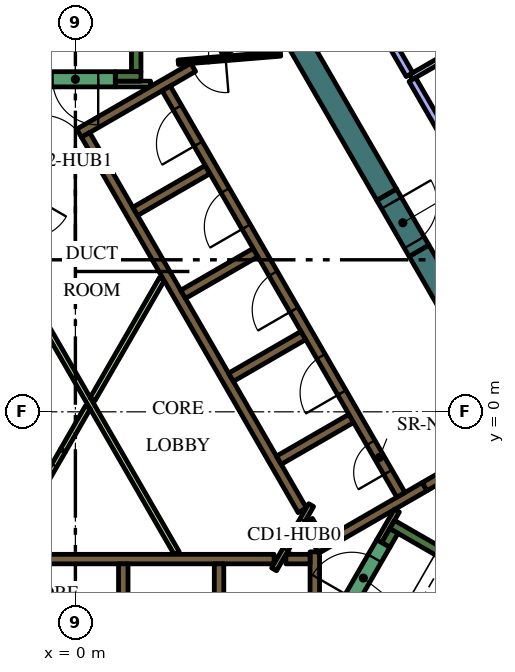
"""IFC4 building model, lengths in metres.
Left out: names, types, materials, properties, quantities, classifications, styles, units other than length and angle.
Written with IfcOpenShell. Run it as: python <this file> out.ifc"""

import sys

from ifc_helpers import new_model, si_unit, direction, frame, frame_2d, origin, place, context, subcontext, project, spatial, rectangle, extrude, element, fill, save


model = new_model("IFC4")
c1 = context("Model", 3, precision=1e-05, world=origin(), true_north=direction((0.0, 1.0)))
c2 = subcontext(c1, "Body", "Model", "MODEL_VIEW")
j1 = project(units=[si_unit("LENGTHUNIT", "METRE"), si_unit("PLANEANGLEUNIT", "RADIAN")], contexts=[c1])
p1 = place(None, origin())
s1 = spatial("IfcSite", under=j1, at=p1, CompositionType="ELEMENT")
p2 = place(p1, origin())
s2 = spatial("IfcBuilding", under=s1, at=p2, CompositionType="ELEMENT")
p3 = place(p2, frame((0.0, 0.0, 279.6)))
s3 = spatial("IfcBuildingStorey", under=s2, at=p3, CompositionType="ELEMENT", Elevation=279.6)
for number, where, z_axis, x_axis in (
    (1, (9.042, 4.239, 0.0), (0.0, 0.0, 1.0), (0.5, -0.866, 0.0)),
    (2, (1.989, 16.456, 0.0), (0.0, 0.0, 1.0), (0.5, -0.866, 0.0)),
):
    element("IfcWall", number, at=place(p3, frame(where, z_axis=z_axis, x_axis=x_axis)), inside=s3, PredefinedType="SOLIDWALL", context=c2, shape_type="SweptSolid", body=[
        extrude(rectangle(XDim=12.406, YDim=0.6, at=frame_2d((6.203, 0.0))), origin(), (0.0, 0.0, 1.0), 4.2),
    ])
p4 = place(p3, frame((8.334, -2.964, 0.0), z_axis=(0.0, 0.0, 1.0), x_axis=(0.866016039709, -0.500016218704, 0.0)))
e3 = element("IfcWall", 3, at=p4, inside=s3, PredefinedType="SOLIDWALL", context=c2, shape_type="SweptSolid", body=[
    extrude(rectangle(XDim=7.05, YDim=0.25, at=frame_2d((3.525, 0.0))), origin(), (0.0, 0.0, 1.0), 4.2),
])
p5 = place(p3, frame((8.168, -3.503, 0.0), z_axis=(0.0, 0.0, 1.0), x_axis=(0.49972245349, 0.866185586049, 0.0)))
e4 = element("IfcWall", 4, at=p5, inside=s3, PredefinedType="SOLIDWALL", context=c2, shape_type="SweptSolid", body=[
    extrude(rectangle(XDim=0.425, YDim=0.25, at=frame_2d((0.212, 0.0))), origin(), (0.0, 0.0, 1.0), 4.2),
])
p6 = place(p3, frame((1.6, 8.95, 0.0), z_axis=(0.0, 0.0, 1.0), x_axis=(0.0, 1.0, 0.0)))
e5 = element("IfcWall", 5, at=p6, inside=s3, PredefinedType="SOLIDWALL", context=c2, shape_type="SweptSolid", body=[
    extrude(rectangle(XDim=6.8, YDim=0.25, at=frame_2d((3.4, 0.0))), origin(), (0.0, 0.0, 1.0), 4.2),
])
p7 = place(p3, frame((1.05, 8.825, 0.0), z_axis=(0.0, 0.0, 1.0), x_axis=(1.0, 0.0, 0.0)))
e6 = element("IfcWall", 6, at=p7, inside=s3, PredefinedType="SOLIDWALL", context=c2, shape_type="SweptSolid", body=[
    extrude(rectangle(XDim=0.675, YDim=0.25, at=frame_2d((0.337, 0.0))), origin(), (0.0, 0.0, 1.0), 4.2),
])
p8 = place(p3, frame((6.3, -7.24, 0.0), z_axis=(0.0, 0.0, 1.0), x_axis=(0.0, 1.0, 0.0)))
e7 = element("IfcWall", 7, at=p8, inside=s3, PredefinedType="SOLIDWALL", context=c2, shape_type="SweptSolid", body=[
    extrude(rectangle(XDim=3.556, YDim=0.25, at=frame_2d((1.778, 0.0))), origin(), (0.0, 0.0, 1.0), 4.2),
])
p9 = place(p3, frame((5.538, -3.875, 0.0), z_axis=(0.0, 0.0, 1.0), x_axis=(1.0, 0.0, 0.0)))
e8 = element("IfcWall", 8, at=p9, inside=s3, PredefinedType="SOLIDWALL", context=c2, shape_type="SweptSolid", body=[
    extrude(rectangle(XDim=0.637, YDim=0.25, at=frame_2d((0.318, 0.0))), origin(), (0.0, 0.0, 1.0), 4.2),
])
p10 = place(p3, frame((-5.259, -3.875, 0.0), z_axis=(0.0, 0.0, 1.0), x_axis=(1.0, 0.0, 0.0)))
e9 = element("IfcWall", 9, at=p10, inside=s3, PredefinedType="SOLIDWALL", context=c2, shape_type="SweptSolid", body=[
    extrude(rectangle(XDim=10.489, YDim=0.25, at=frame_2d((5.244, 0.0))), origin(), (0.0, 0.0, 1.0), 4.2),
])
for number, where, z_axis, x_axis in (
    (10, (1.26, -4.0, 0.0), (0.0, 0.0, 1.0), (0.0, -1.0, 0.0)),
    (11, (3.78, -4.0, 0.0), (0.0, 0.0, 1.0), (0.0, -1.0, 0.0)),
):
    element("IfcWall", number, at=place(p3, frame(where, z_axis=z_axis, x_axis=x_axis)), inside=s3, PredefinedType="SOLIDWALL", context=c2, shape_type="SweptSolid", body=[
        extrude(rectangle(XDim=2.2, YDim=0.25, at=frame_2d((1.1, 0.0))), origin(), (0.0, 0.0, 1.0), 4.2),
    ])
p11 = place(p3, frame((9.19, -1.969, 0.0), z_axis=(0.0, 0.0, 1.0), x_axis=(-0.866057109641, -0.499945079824, 0.0)))
e12 = element("IfcWall", 12, at=p11, inside=s3, PredefinedType="SOLIDWALL", context=c2, shape_type="SweptSolid", body=[
    extrude(rectangle(XDim=3.291, YDim=0.25, at=frame_2d((1.646, 0.0))), origin(), (0.0, 0.0, 1.0), 4.2),
])
p12 = place(p3, frame((6.13, -2.867, 0.0), z_axis=(0.0, 0.0, 1.0), x_axis=(0.500160776593, -0.865932559475, 0.0)))
e13 = element("IfcWall", 13, at=p12, inside=s3, PredefinedType="SOLIDWALL", context=c2, shape_type="SweptSolid", body=[
    extrude(rectangle(XDim=0.627, YDim=0.25, at=frame_2d((0.313, 0.0))), origin(), (0.0, 0.0, 1.0), 4.2),
])
p13 = place(p3, frame((3.1, 9.064, 0.0), z_axis=(0.0, 0.0, 1.0), x_axis=(-0.866033137035, -0.499986605379, 0.0)))
e14 = element("IfcWall", 14, at=p13, inside=s3, PredefinedType="SOLIDWALL", context=c2, shape_type="SweptSolid", body=[
    extrude(rectangle(XDim=3.467, YDim=0.25, at=frame_2d((1.733, 0.0))), origin(), (0.0, 0.0, 1.0), 4.2),
])
p14 = place(p3, frame((0.268, 7.285, 0.0), z_axis=(0.0, 0.0, 1.0), x_axis=(0.500098681536, -0.865968422476, 0.0)))
e15 = element("IfcWall", 15, at=p14, inside=s3, PredefinedType="SOLIDWALL", context=c2, shape_type="SweptSolid", body=[
    extrude(rectangle(XDim=0.636, YDim=0.25, at=frame_2d((0.318, 0.0))), origin(), (0.0, 0.0, 1.0), 4.2),
])
p15 = place(p3, frame((5.97, -2.591, 0.0), z_axis=(0.0, 0.0, 1.0), x_axis=(-0.499994469932, 0.866028596547, 0.0)))
e16 = element("IfcWall", 16, at=p15, inside=s3, PredefinedType="SOLIDWALL", context=c2, shape_type="SweptSolid", body=[
    extrude(rectangle(XDim=10.488, YDim=0.25, at=frame_2d((5.244, 0.0))), origin(), (0.0, 0.0, 1.0), 4.2),
])
p16 = place(p3, frame((1.574, 5.274, 0.0), z_axis=(0.0, 0.0, 1.0), x_axis=(0.866028486751, 0.499994660107, 0.0)))
e17 = element("IfcWall", 17, at=p16, inside=s3, PredefinedType="SOLIDWALL", context=c2, shape_type="SweptSolid", body=[
    extrude(rectangle(XDim=2.2, YDim=0.25, at=frame_2d((1.1, 0.0))), origin(), (0.0, 0.0, 1.0), 4.2),
])
for number, where, z_axis, x_axis in (
    (18, (2.834, 3.091, 0.0), (0.0, 0.0, 1.0), (0.866, 0.5, 0.0)),
    (19, (4.094, 0.909, 0.0), (0.0, 0.0, 1.0), (0.866, 0.5, 0.0)),
    (20, (5.354, -1.274, 0.0), (0.0, 0.0, 1.0), (0.866, 0.5, 0.0)),
):
    element("IfcWall", number, at=place(p3, frame(where, z_axis=z_axis, x_axis=x_axis)), inside=s3, PredefinedType="SOLIDWALL", context=c2, shape_type="SweptSolid", body=[
        extrude(rectangle(XDim=2.2, YDim=0.25, at=frame_2d((1.1, 0.0))), origin(), (0.0, 0.0, 1.0), 4.2),
    ])
p17 = place(p3, frame((3.83, 9.486, 0.0), z_axis=(0.0, 0.0, 1.0), x_axis=(0.865986202621, 0.500067892261, 0.0)))
e21 = element("IfcWall", 21, at=p17, inside=s3, PredefinedType="SOLIDWALL", context=c2, shape_type="SweptSolid", body=[
    extrude(rectangle(XDim=1.591, YDim=0.25, at=frame_2d((0.795, 0.0))), origin(), (0.0, 0.0, 1.0), 4.2),
])
p18 = place(p3, frame((1.05, 8.625, 0.0), z_axis=(0.0, 0.0, 1.0), x_axis=(1.0, 0.0, 0.0)))
e22 = element("IfcWall", 22, at=p18, inside=s3, PredefinedType="PARTITIONING", context=c2, shape_type="SweptSolid", body=[
    extrude(rectangle(XDim=0.929, YDim=0.15, at=frame_2d((0.464, 0.0))), origin(), (0.0, 0.0, 1.0), 3.55),
])
p19 = place(p3, frame((8.459, -2.599, 0.0), z_axis=(0.0, 0.0, 1.0), x_axis=(-0.500041054325, -0.866001699761, 0.0)))
e23 = element("IfcWall", 23, at=p19, inside=s3, PredefinedType="PARTITIONING", context=c2, shape_type="SweptSolid", body=[
    extrude(rectangle(XDim=0.929, YDim=0.15, at=frame_2d((0.464, 0.0))), origin(), (0.0, 0.0, 1.0), 4.2),
])
p20 = place(p3, frame((-1.887, 4.168, 0.0), z_axis=(0.0, 0.0, 1.0), x_axis=(0.499997069472, -0.866027095719, 0.0)))
e24 = element("IfcWall", 24, at=p20, inside=s3, PredefinedType="PARTITIONING", context=c2, shape_type="SweptSolid", body=[
    extrude(rectangle(XDim=9.106, YDim=0.15, at=frame_2d((4.553, 0.0))), origin(), (0.0, 0.0, 1.0), 3.55),
])
p21 = place(p3, frame((-0.329, -1.021, 0.0), z_axis=(0.0, 0.0, 1.0), x_axis=(0.500033191285, 0.866006239939, 0.0)))
e25 = element("IfcWall", 25, at=p21, inside=s3, PredefinedType="PARTITIONING", context=c2, shape_type="SweptSolid", body=[
    extrude(rectangle(XDim=1.315, YDim=0.15, at=frame_2d((0.657, 0.0))), origin(), (0.0, 0.0, 1.0), 3.55),
])
p22 = place(p3, frame((2.277, 3.493, 0.0), z_axis=(0.0, 0.0, 1.0), x_axis=(-0.499994550825, -0.866028549844, 0.0)))
e26 = element("IfcWall", 26, at=p22, inside=s3, PredefinedType="PARTITIONING", context=c2, shape_type="SweptSolid", body=[
    extrude(rectangle(XDim=3.65, YDim=0.15, at=frame_2d((1.825, 0.0))), origin(), (0.0, 0.0, 1.0), 3.55),
])
p23 = place(p3, frame((8.565, -2.185, 0.0), z_axis=(0.0, 0.0, 1.0), x_axis=(-0.499997954832, 0.866026584559, 0.0)))
e27 = element("IfcWall", 27, at=p23, inside=s3, PredefinedType="SOLIDWALL", context=c2, shape_type="SweptSolid", body=[
    extrude(rectangle(XDim=12.35, YDim=0.25, at=frame_2d((6.175, 0.0))), origin(), (0.0, 0.0, 1.0), 4.2),
])
p24 = place(p23, frame((0.685, 0.0, 0.0)))
e28 = element("IfcOpeningElement", 28, at=p24, cuts=e27, PredefinedType="OPENING", context=c2, shape_type="SweptSolid", body=[
    extrude(rectangle(XDim=0.9, YDim=2.1, at=frame_2d((0.45, 1.05))), frame((0.0, 0.135, 0.0), z_axis=(0.0, -1.0, 0.0), x_axis=(1.0, 0.0, 0.0)), (0.0, 0.0, 1.0), 0.27),
])
p25 = place(p23, frame((3.105, 0.0, 0.0)))
e29 = element("IfcOpeningElement", 29, at=p25, cuts=e27, PredefinedType="OPENING", context=c2, shape_type="SweptSolid", body=[
    extrude(rectangle(XDim=1.1, YDim=2.1, at=frame_2d((0.55, 1.05))), frame((0.0, 0.135, 0.0), z_axis=(0.0, -1.0, 0.0), x_axis=(1.0, 0.0, 0.0)), (0.0, 0.0, 1.0), 0.27),
])
p26 = place(p23, frame((5.625, 0.0, 0.0)))
e30 = element("IfcOpeningElement", 30, at=p26, cuts=e27, PredefinedType="OPENING", context=c2, shape_type="SweptSolid", body=[
    extrude(rectangle(XDim=1.1, YDim=2.1, at=frame_2d((0.55, 1.05))), frame((0.0, 0.135, 0.0), z_axis=(0.0, -1.0, 0.0), x_axis=(1.0, 0.0, 0.0)), (0.0, 0.0, 1.0), 0.27),
])
p27 = place(p23, frame((8.145, 0.0, 0.0)))
e31 = element("IfcOpeningElement", 31, at=p27, cuts=e27, PredefinedType="OPENING", context=c2, shape_type="SweptSolid", body=[
    extrude(rectangle(XDim=1.1, YDim=2.1, at=frame_2d((0.55, 1.05))), frame((0.0, 0.135, 0.0), z_axis=(0.0, -1.0, 0.0), x_axis=(1.0, 0.0, 0.0)), (0.0, 0.0, 1.0), 0.27),
])
p28 = place(p23, frame((10.665, 0.0, 0.0)))
e32 = element("IfcOpeningElement", 32, at=p28, cuts=e27, PredefinedType="OPENING", context=c2, shape_type="SweptSolid", body=[
    extrude(rectangle(XDim=1.1, YDim=2.1, at=frame_2d((0.55, 1.05))), frame((0.0, 0.135, 0.0), z_axis=(0.0, -1.0, 0.0), x_axis=(1.0, 0.0, 0.0)), (0.0, 0.0, 1.0), 0.27),
])
p29 = place(p3, frame((7.053, -5.284, 0.0), z_axis=(0.0, 0.0, 1.0), x_axis=(0.500078061341, 0.865980330357, 0.0)))
e33 = element("IfcWall", 33, at=p29, inside=s3, PredefinedType="SOLIDWALL", context=c2, shape_type="SweptSolid", body=[
    extrude(rectangle(XDim=2.1, YDim=0.4, at=frame_2d((1.05, 0.0))), origin(), (0.0, 0.0, 1.0), 4.2),
])
p30 = place(p29, frame((0.45, 0.0, 0.0)))
e34 = element("IfcOpeningElement", 34, at=p30, cuts=e33, PredefinedType="OPENING", context=c2, shape_type="SweptSolid", body=[
    extrude(rectangle(XDim=1.2, YDim=2.1, at=frame_2d((0.6, 1.05))), frame((0.0, 0.21, 0.0), z_axis=(0.0, -1.0, 0.0), x_axis=(1.0, 0.0, 0.0)), (0.0, 0.0, 1.0), 0.42),
])
p31 = place(p3, frame((1.05, 8.75, 0.0), z_axis=(0.0, 0.0, 1.0), x_axis=(-1.0, 0.0, 0.0)))
e35 = element("IfcWall", 35, at=p31, inside=s3, PredefinedType="SOLIDWALL", context=c2, shape_type="SweptSolid", body=[
    extrude(rectangle(XDim=2.1, YDim=0.4, at=frame_2d((1.05, 0.0))), origin(), (0.0, 0.0, 1.0), 4.2),
])
p32 = place(p31, frame((0.45, 0.0, 0.0)))
e36 = element("IfcOpeningElement", 36, at=p32, cuts=e35, PredefinedType="OPENING", context=c2, shape_type="SweptSolid", body=[
    extrude(rectangle(XDim=1.2, YDim=2.1, at=frame_2d((0.6, 1.05))), frame((0.0, 0.21, 0.0), z_axis=(0.0, -1.0, 0.0), x_axis=(1.0, 0.0, 0.0)), (0.0, 0.0, 1.0), 0.42),
])
p33 = place(p3, frame((5.398, 9.419, 0.0), z_axis=(0.0, 0.0, 1.0), x_axis=(-0.996653416376, -0.081743303248, 0.0)))
e37 = element("IfcWall", 37, at=p33, inside=s3, PredefinedType="PARTITIONING", context=c2, shape_type="SweptSolid", body=[
    extrude(rectangle(XDim=2.7, YDim=0.12, at=frame_2d((1.35, 0.0))), origin(), (0.0, 0.0, 1.0), 3.55),
])
p34 = place(p33, frame((1.45, 0.0, 0.0)))
e38 = element("IfcOpeningElement", 38, at=p34, cuts=e37, PredefinedType="OPENING", context=c2, shape_type="SweptSolid", body=[
    extrude(rectangle(XDim=0.9, YDim=2.1, at=frame_2d((0.45, 1.05))), frame((0.0, 0.07, 0.0), z_axis=(0.0, -1.0, 0.0), x_axis=(1.0, 0.0, 0.0)), (0.0, 0.0, 1.0), 0.14),
])
p35 = place(p3, frame((6.203, -2.456, 0.0), z_axis=(0.0, 0.0, 1.0), x_axis=(-0.500043961785, -0.866000020948, 0.0)))
e39 = element("IfcWall", 39, at=p35, inside=s3, PredefinedType="PARTITIONING", context=c2, shape_type="SweptSolid", body=[
    extrude(rectangle(XDim=1.95, YDim=0.15, at=frame_2d((0.975, 0.0))), origin(), (0.0, 0.0, 1.0), 4.2),
])
p36 = place(p35, frame((0.45, 0.0, 0.0)))
e40 = element("IfcOpeningElement", 40, at=p36, cuts=e39, PredefinedType="OPENING", context=c2, shape_type="SweptSolid", body=[
    extrude(rectangle(XDim=0.9, YDim=2.1, at=frame_2d((0.45, 1.05))), frame((0.0, 0.085, 0.0), z_axis=(0.0, -1.0, 0.0), x_axis=(1.0, 0.0, 0.0)), (0.0, 0.0, 1.0), 0.17),
])
p37 = place(p3, frame((-1.303, 6.6, 0.0), z_axis=(0.0, 0.0, 1.0), x_axis=(1.0, 0.0, 0.0)))
e41 = element("IfcWall", 41, at=p37, inside=s3, PredefinedType="PARTITIONING", context=c2, shape_type="SweptSolid", body=[
    extrude(rectangle(XDim=2.1, YDim=0.15, at=frame_2d((1.05, 0.0))), origin(), (0.0, 0.0, 1.0), 4.2),
])
p38 = place(p37, frame((0.45, 0.0, 0.0)))
e42 = element("IfcOpeningElement", 42, at=p38, cuts=e41, PredefinedType="OPENING", context=c2, shape_type="SweptSolid", body=[
    extrude(rectangle(XDim=1.2, YDim=2.1, at=frame_2d((0.6, 1.05))), frame((0.0, 0.085, 0.0), z_axis=(0.0, -1.0, 0.0), x_axis=(1.0, 0.0, 0.0)), (0.0, 0.0, 1.0), 0.17),
])
p39 = place(p3, frame((11.009, -0.919, 0.0), z_axis=(0.0, 0.0, 1.0), x_axis=(-0.866059744384, -0.49994051562, 0.0)))
e43 = element("IfcWall", 43, at=p39, inside=s3, PredefinedType="SOLIDWALL", context=c2, shape_type="SweptSolid", body=[
    extrude(rectangle(XDim=2.1, YDim=0.25, at=frame_2d((1.05, 0.0))), origin(), (0.0, 0.0, 1.0), 4.2),
])
p40 = place(p39, frame((0.45, 0.0, 0.0)))
e44 = element("IfcOpeningElement", 44, at=p40, cuts=e43, PredefinedType="OPENING", context=c2, shape_type="SweptSolid", body=[
    extrude(rectangle(XDim=1.2, YDim=2.1, at=frame_2d((0.6, 1.05))), frame((0.0, 0.135, 0.0), z_axis=(0.0, -1.0, 0.0), x_axis=(1.0, 0.0, 0.0)), (0.0, 0.0, 1.0), 0.27),
])
p41 = place(p3, frame((8.192, 5.711, 0.0), z_axis=(0.0, 0.0, 1.0), x_axis=(0.500062241894, -0.865989465428, 0.0)))
e45 = element("IfcWall", 45, at=p41, inside=s3, PredefinedType="SOLIDWALL", context=c2, shape_type="SweptSolid", body=[
    extrude(rectangle(XDim=1.7, YDim=0.6, at=frame_2d((0.85, 0.0))), origin(), (0.0, 0.0, 1.0), 4.2),
])
p42 = place(p41, frame((0.25, 0.0, 0.0)))
e46 = element("IfcOpeningElement", 46, at=p42, cuts=e45, PredefinedType="OPENING", context=c2, shape_type="SweptSolid", body=[
    extrude(rectangle(XDim=1.2, YDim=2.1, at=frame_2d((0.6, 1.05))), frame((0.0, 0.31, 0.0), z_axis=(0.0, -1.0, 0.0), x_axis=(1.0, 0.0, 0.0)), (0.0, 0.0, 1.0), 0.62),
])
p43 = place(p3, frame((-1.229, -2.579, 0.0), z_axis=(0.0, 0.0, 1.0), x_axis=(0.500062916607, 0.865989075817, 0.0)))
e47 = element("IfcWall", 47, at=p43, inside=s3, PredefinedType="PARTITIONING", context=c2, shape_type="SweptSolid", body=[
    extrude(rectangle(XDim=1.8, YDim=0.15, at=frame_2d((0.9, 0.0))), origin(), (0.0, 0.0, 1.0), 3.55),
])
p44 = place(p43, frame((0.45, 0.0, 0.0)))
e48 = element("IfcOpeningElement", 48, at=p44, cuts=e47, PredefinedType="OPENING", context=c2, shape_type="SweptSolid", body=[
    extrude(rectangle(XDim=0.9, YDim=2.1, at=frame_2d((0.45, 1.05))), frame((0.0, 0.085, 0.0), z_axis=(0.0, -1.0, 0.0), x_axis=(1.0, 0.0, 0.0)), (0.0, 0.0, 1.0), 0.17),
])
p45 = place(p3, frame((8.829, 8.808, 0.0), z_axis=(0.0, 0.0, 1.0), x_axis=(0.866041857893, 0.499971499565, 0.0)))
e49 = element("IfcWall", 49, at=p45, inside=s3, PredefinedType="PARTITIONING", context=c2, shape_type="SweptSolid", body=[
    extrude(rectangle(XDim=3.083, YDim=0.15, at=frame_2d((1.542, 0.0))), origin(), (0.0, 0.0, 1.0), 3.55),
])
p46 = place(p45, frame((1.1, 0.0, 0.0)))
e50 = element("IfcOpeningElement", 50, at=p46, cuts=e49, PredefinedType="OPENING", context=c2, shape_type="SweptSolid", body=[
    extrude(rectangle(XDim=0.9, YDim=2.1, at=frame_2d((0.45, 1.05))), frame((0.0, 0.085, 0.0), z_axis=(0.0, -1.0, 0.0), x_axis=(1.0, 0.0, 0.0)), (0.0, 0.0, 1.0), 0.17),
])
p47 = place(p3, frame((13.436, 0.829, 0.0), z_axis=(0.0, 0.0, 1.0), x_axis=(-0.499983789798, 0.866034762547, 0.0)))
e51 = element("IfcWall", 51, at=p47, inside=s3, PredefinedType="PARTITIONING", context=c2, shape_type="SweptSolid", body=[
    extrude(rectangle(XDim=9.138, YDim=0.2, at=frame_2d((4.569, 0.0))), origin(), (0.0, 0.0, 1.0), 3.55),
])
p48 = place(p3, frame((8.792, 8.873, 0.0), z_axis=(0.0, 0.0, 1.0), x_axis=(-0.499992600721, 0.866029675718, 0.0)))
e52 = element("IfcWall", 52, at=p48, inside=s3, PredefinedType="PARTITIONING", context=c2, shape_type="SweptSolid", body=[
    extrude(rectangle(XDim=2.712, YDim=0.2, at=frame_2d((1.356, 0.0))), origin(), (0.0, 0.0, 1.0), 3.55),
])
p49 = place(p24, origin())
e53 = element("IfcDoor", 53, at=p49, inside=s3, OperationType="SINGLE_SWING_LEFT", PredefinedType="DOOR", context=c2, shape_type="SweptSolid", body=[
    extrude(rectangle(XDim=0.9, YDim=2.1, at=frame_2d((0.45, 1.05))), frame((0.0, 0.025, 0.0), z_axis=(0.0, -1.0, 0.0), x_axis=(1.0, 0.0, 0.0)), (0.0, 0.0, 1.0), 0.05),
])
fill(e28, e53)
p50 = place(p25, origin())
e54 = element("IfcDoor", 54, at=p50, inside=s3, OperationType="DOUBLE_DOOR_SLIDING", PredefinedType="DOOR", context=c2, shape_type="SweptSolid", body=[
    extrude(rectangle(XDim=1.1, YDim=2.1, at=frame_2d((0.55, 1.05))), frame((0.0, 0.025, 0.0), z_axis=(0.0, -1.0, 0.0), x_axis=(1.0, 0.0, 0.0)), (0.0, 0.0, 1.0), 0.05),
])
fill(e29, e54)
p51 = place(p26, origin())
e55 = element("IfcDoor", 55, at=p51, inside=s3, OperationType="DOUBLE_DOOR_SLIDING", PredefinedType="DOOR", context=c2, shape_type="SweptSolid", body=[
    extrude(rectangle(XDim=1.1, YDim=2.1, at=frame_2d((0.55, 1.05))), frame((0.0, 0.025, 0.0), z_axis=(0.0, -1.0, 0.0), x_axis=(1.0, 0.0, 0.0)), (0.0, 0.0, 1.0), 0.05),
])
fill(e30, e55)
p52 = place(p27, origin())
e56 = element("IfcDoor", 56, at=p52, inside=s3, OperationType="DOUBLE_DOOR_SLIDING", PredefinedType="DOOR", context=c2, shape_type="SweptSolid", body=[
    extrude(rectangle(XDim=1.1, YDim=2.1, at=frame_2d((0.55, 1.05))), frame((0.0, 0.025, 0.0), z_axis=(0.0, -1.0, 0.0), x_axis=(1.0, 0.0, 0.0)), (0.0, 0.0, 1.0), 0.05),
])
fill(e31, e56)
p53 = place(p28, origin())
e57 = element("IfcDoor", 57, at=p53, inside=s3, OperationType="DOUBLE_DOOR_SLIDING", PredefinedType="DOOR", context=c2, shape_type="SweptSolid", body=[
    extrude(rectangle(XDim=1.1, YDim=2.1, at=frame_2d((0.55, 1.05))), frame((0.0, 0.025, 0.0), z_axis=(0.0, -1.0, 0.0), x_axis=(1.0, 0.0, 0.0)), (0.0, 0.0, 1.0), 0.05),
])
fill(e32, e57)
p54 = place(p30, origin())
e58 = element("IfcDoor", 58, at=p54, inside=s3, OperationType="SINGLE_SWING_LEFT", PredefinedType="DOOR", context=c2, shape_type="SweptSolid", body=[
    extrude(rectangle(XDim=1.2, YDim=2.1, at=frame_2d((0.6, 1.05))), frame((0.0, 0.025, 0.0), z_axis=(0.0, -1.0, 0.0), x_axis=(1.0, 0.0, 0.0)), (0.0, 0.0, 1.0), 0.05),
])
fill(e34, e58)
p55 = place(p32, origin())
e59 = element("IfcDoor", 59, at=p55, inside=s3, OperationType="SINGLE_SWING_LEFT", PredefinedType="DOOR", context=c2, shape_type="SweptSolid", body=[
    extrude(rectangle(XDim=1.2, YDim=2.1, at=frame_2d((0.6, 1.05))), frame((0.0, 0.025, 0.0), z_axis=(0.0, -1.0, 0.0), x_axis=(1.0, 0.0, 0.0)), (0.0, 0.0, 1.0), 0.05),
])
fill(e36, e59)
p56 = place(p34, origin())
e60 = element("IfcDoor", 60, at=p56, inside=s3, OperationType="SINGLE_SWING_LEFT", PredefinedType="DOOR", context=c2, shape_type="SweptSolid", body=[
    extrude(rectangle(XDim=0.9, YDim=2.1, at=frame_2d((0.45, 1.05))), frame((0.0, 0.025, 0.0), z_axis=(0.0, -1.0, 0.0), x_axis=(1.0, 0.0, 0.0)), (0.0, 0.0, 1.0), 0.05),
])
fill(e38, e60)
p57 = place(p36, origin())
e61 = element("IfcDoor", 61, at=p57, inside=s3, OperationType="SINGLE_SWING_LEFT", PredefinedType="DOOR", context=c2, shape_type="SweptSolid", body=[
    extrude(rectangle(XDim=0.9, YDim=2.1, at=frame_2d((0.45, 1.05))), frame((0.0, 0.025, 0.0), z_axis=(0.0, -1.0, 0.0), x_axis=(1.0, 0.0, 0.0)), (0.0, 0.0, 1.0), 0.05),
])
fill(e40, e61)
p58 = place(p38, origin())
e62 = element("IfcDoor", 62, at=p58, inside=s3, OperationType="SINGLE_SWING_LEFT", PredefinedType="DOOR", context=c2, shape_type="SweptSolid", body=[
    extrude(rectangle(XDim=1.2, YDim=2.1, at=frame_2d((0.6, 1.05))), frame((0.0, 0.025, 0.0), z_axis=(0.0, -1.0, 0.0), x_axis=(1.0, 0.0, 0.0)), (0.0, 0.0, 1.0), 0.05),
])
fill(e42, e62)
p59 = place(p42, origin())
e63 = element("IfcDoor", 63, at=p59, inside=s3, OperationType="SINGLE_SWING_LEFT", PredefinedType="DOOR", context=c2, shape_type="SweptSolid", body=[
    extrude(rectangle(XDim=1.2, YDim=2.1, at=frame_2d((0.6, 1.05))), frame((0.0, 0.025, 0.0), z_axis=(0.0, -1.0, 0.0), x_axis=(1.0, 0.0, 0.0)), (0.0, 0.0, 1.0), 0.05),
])
fill(e46, e63)
p60 = place(p44, origin())
e64 = element("IfcDoor", 64, at=p60, inside=s3, OperationType="SINGLE_SWING_LEFT", PredefinedType="DOOR", context=c2, shape_type="SweptSolid", body=[
    extrude(rectangle(XDim=0.9, YDim=2.1, at=frame_2d((0.45, 1.05))), frame((0.0, 0.025, 0.0), z_axis=(0.0, -1.0, 0.0), x_axis=(1.0, 0.0, 0.0)), (0.0, 0.0, 1.0), 0.05),
])
fill(e48, e64)
save(model, sys.argv[1])
